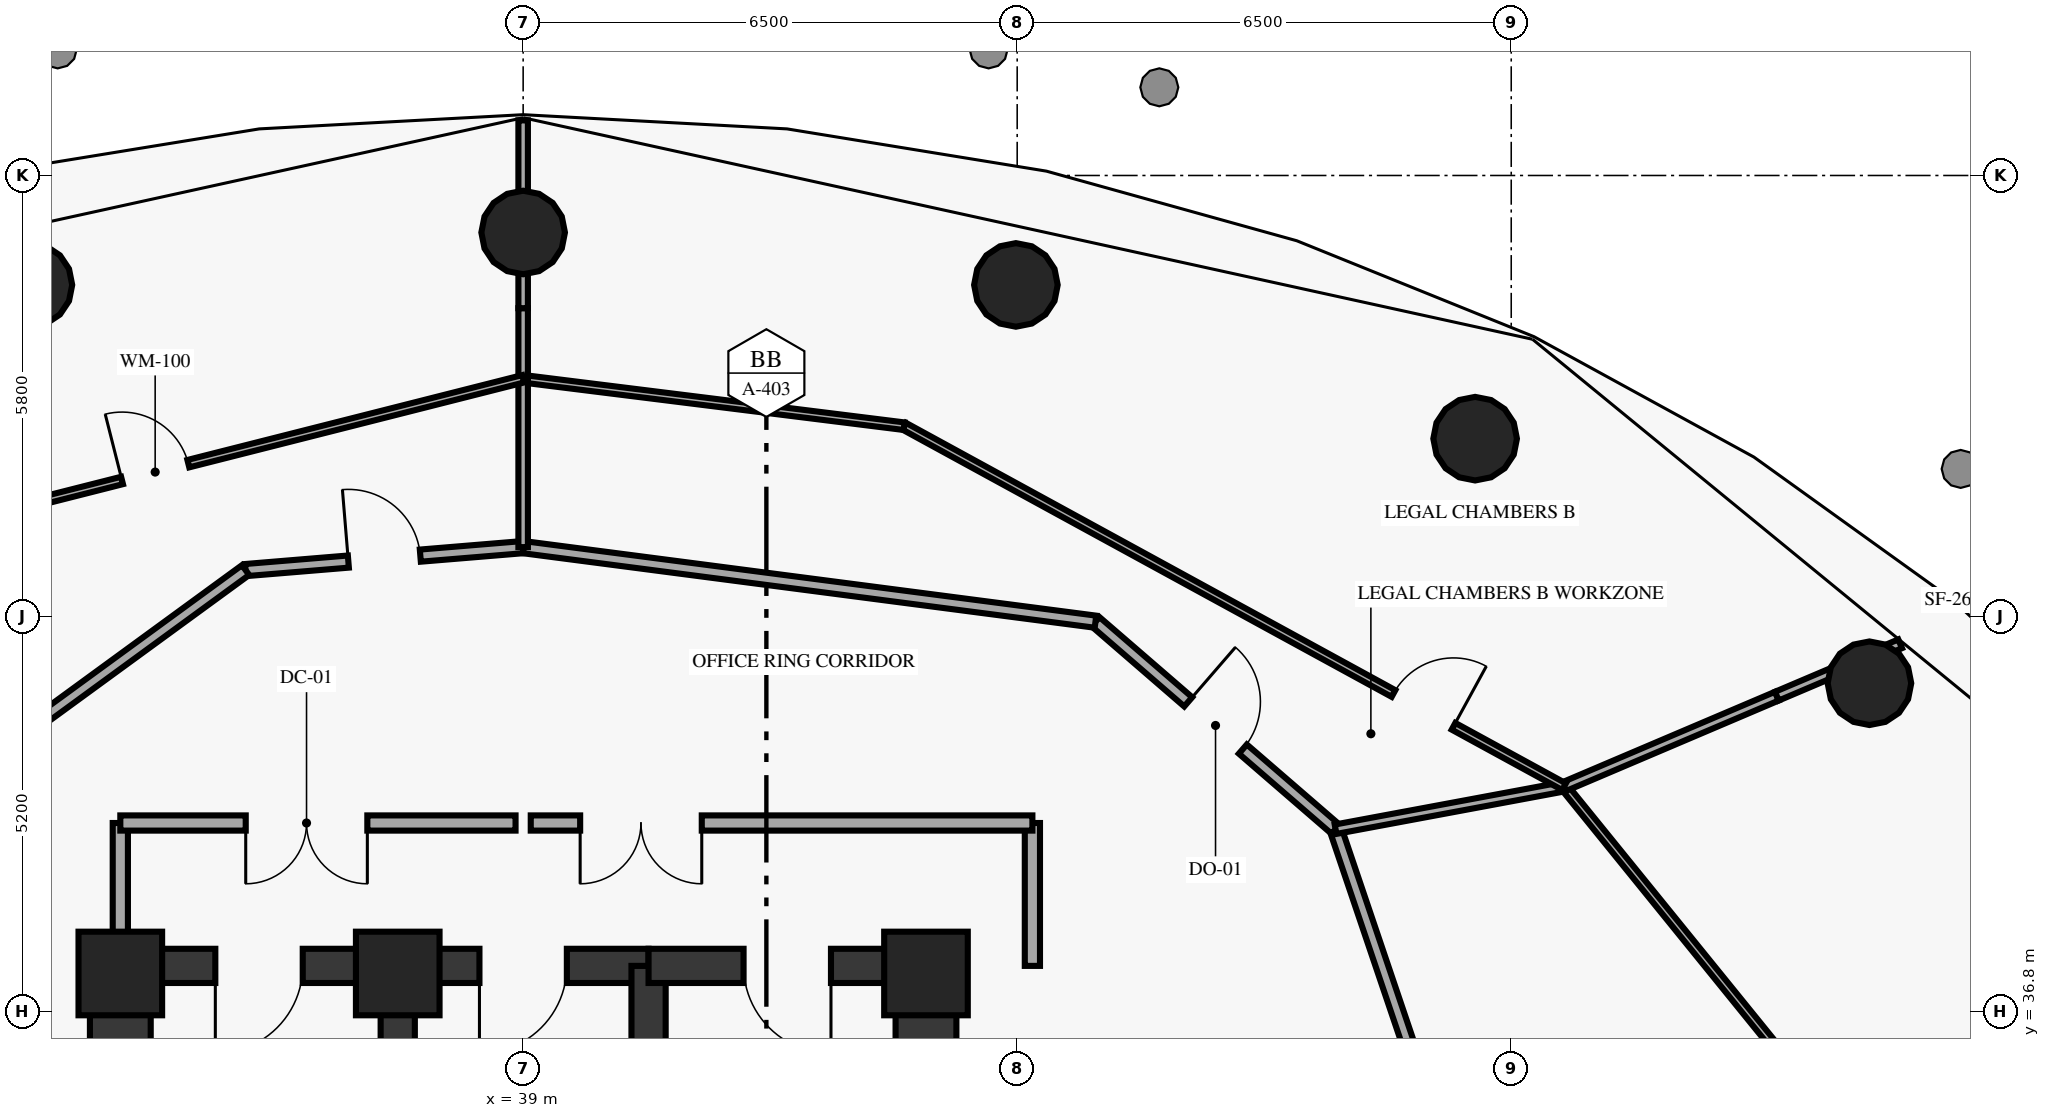
"""IFC4 building model, lengths in metres.
Left out: names, types, materials, properties, quantities, classifications, styles, units other than length and angle.
Written with IfcOpenShell. Run it as: python <this file> out.ifc"""

import sys

from ifc_helpers import new_model, si_unit, direction, frame, frame_2d, origin, origin_2d, place, context, subcontext, project, spatial, rectangle, circle, extrude, element, fill, save


model = new_model("IFC4")
c1 = context("Model", 3, precision=1e-05, world=origin(), true_north=direction((0.0, 1.0)))
c2 = subcontext(c1, "Body", "Model", "MODEL_VIEW")
j1 = project(units=[si_unit("LENGTHUNIT", "METRE"), si_unit("PLANEANGLEUNIT", "RADIAN")], contexts=[c1])
p1 = place(None, origin())
s1 = spatial("IfcSite", under=j1, at=p1, CompositionType="ELEMENT")
p2 = place(p1, origin())
s2 = spatial("IfcBuilding", under=s1, at=p2, CompositionType="ELEMENT")
p3 = place(p2, frame((0.0, 0.0, 53.4)))
s3 = spatial("IfcBuildingStorey", under=s2, at=p3, CompositionType="ELEMENT", Elevation=53.4)
for number, where, z_axis, x_axis in (
    (1, (44.3, 37.3, 0.0), (0.0, 0.0, 1.0), (1.0, 0.0, 0.0)),
    (2, (37.35, 37.3, 0.0), (0.0, 0.0, 1.0), (1.0, 0.0, 0.0)),
    (3, (33.7, 37.3, 0.0), (0.0, 0.0, 1.0), (1.0, 0.0, 0.0)),
):
    element("IfcColumn", number, at=place(p3, frame(where, z_axis=z_axis, x_axis=x_axis)), inside=s3, PredefinedType="PILASTER", context=c2, shape_type="SweptSolid", body=[
        extrude(rectangle(XDim=1.1, YDim=1.1, at=origin_2d()), origin(), (0.0, 0.0, 1.0), 3.8),
    ])
for number, where, z_axis, x_axis in (
    (4, (56.713, 41.119, 0.0), (0.0, 0.0, 1.0), (1.0, 0.0, 0.0)),
    (5, (51.525, 44.337, 0.0), (0.0, 0.0, 1.0), (1.0, 0.0, 0.0)),
    (6, (45.483, 46.36, 0.0), (0.0, 0.0, 1.0), (1.0, 0.0, 0.0)),
    (7, (39.0, 47.05, 0.0), (0.0, 0.0, 1.0), (1.0, 0.0, 0.0)),
    (8, (32.517, 46.36, 0.0), (0.0, 0.0, 1.0), (1.0, 0.0, 0.0)),
):
    element("IfcColumn", number, at=place(p3, frame(where, z_axis=z_axis, x_axis=x_axis)), inside=s3, PredefinedType="COLUMN", context=c2, shape_type="SweptSolid", body=[
        extrude(circle(Radius=0.55, at=origin_2d()), origin(), (0.0, 0.0, 1.0), 3.8),
    ])
for number, where, z_axis, x_axis in (
    (9, (33.7, 29.05, 0.0), (0.0, 0.0, 1.0), (0.0, 1.0, 0.0)),
    (10, (44.3, 29.05, 0.0), (0.0, 0.0, 1.0), (0.0, 1.0, 0.0)),
):
    element("IfcWall", number, at=place(p3, frame(where, z_axis=z_axis, x_axis=x_axis)), inside=s3, PredefinedType="SHEAR", context=c2, shape_type="SweptSolid", body=[
        extrude(rectangle(XDim=8.35, YDim=0.8, at=frame_2d((4.175, 0.0))), origin(), (0.0, 0.0, 1.0), 3.8),
    ])
p4 = place(p3, frame((37.35, 37.4, 0.0), z_axis=(0.0, 0.0, 1.0), x_axis=(-1.0, 0.0, 0.0)))
e11 = element("IfcWall", 11, at=p4, inside=s3, PredefinedType="SHEAR", context=c2, shape_type="SweptSolid", body=[
    extrude(rectangle(XDim=3.65, YDim=0.45, at=frame_2d((1.825, 0.0))), origin(), (0.0, 0.0, 1.0), 3.8),
])
p5 = place(p4, frame((1.25, 0.0, 0.0)))
e12 = element("IfcOpeningElement", 12, at=p5, cuts=e11, PredefinedType="OPENING", context=c2, shape_type="SweptSolid", body=[
    extrude(rectangle(XDim=1.15, YDim=2.15, at=frame_2d((0.575, 1.075))), frame((0.0, 0.235, 0.0), z_axis=(0.0, -1.0, 0.0), x_axis=(1.0, 0.0, 0.0)), (0.0, 0.0, 1.0), 0.47),
])
p6 = place(p3, frame((37.35, 29.05, 0.0), z_axis=(0.0, 0.0, 1.0), x_axis=(0.0, 1.0, 0.0)))
e13 = element("IfcWall", 13, at=p6, inside=s3, PredefinedType="SHEAR", context=c2, shape_type="SweptSolid", body=[
    extrude(rectangle(XDim=8.35, YDim=0.45, at=frame_2d((4.175, 0.0))), origin(), (0.0, 0.0, 1.0), 3.8),
])
p7 = place(p3, frame((40.65, 37.4, 0.0), z_axis=(0.0, 0.0, 1.0), x_axis=(-1.0, 0.0, 0.0)))
e14 = element("IfcWall", 14, at=p7, inside=s3, PredefinedType="SHEAR", context=c2, shape_type="SweptSolid", body=[
    extrude(rectangle(XDim=3.3, YDim=0.45, at=frame_2d((1.65, 0.0))), origin(), (0.0, 0.0, 1.0), 3.8),
])
p8 = place(p7, frame((1.075, 0.0, 0.0)))
e15 = element("IfcOpeningElement", 15, at=p8, cuts=e14, PredefinedType="OPENING", context=c2, shape_type="SweptSolid", body=[
    extrude(rectangle(XDim=1.15, YDim=2.15, at=frame_2d((0.575, 1.075))), frame((0.0, 0.235, 0.0), z_axis=(0.0, -1.0, 0.0), x_axis=(1.0, 0.0, 0.0)), (0.0, 0.0, 1.0), 0.47),
])
p9 = place(p3, frame((40.65, 29.05, 0.0), z_axis=(0.0, 0.0, 1.0), x_axis=(0.0, 1.0, 0.0)))
e16 = element("IfcWall", 16, at=p9, inside=s3, PredefinedType="SHEAR", context=c2, shape_type="SweptSolid", body=[
    extrude(rectangle(XDim=8.35, YDim=0.45, at=frame_2d((4.175, 0.0))), origin(), (0.0, 0.0, 1.0), 3.8),
])
p10 = place(p3, frame((44.3, 37.4, 0.0), z_axis=(0.0, 0.0, 1.0), x_axis=(-1.0, 0.0, 0.0)))
e17 = element("IfcWall", 17, at=p10, inside=s3, PredefinedType="SHEAR", context=c2, shape_type="SweptSolid", body=[
    extrude(rectangle(XDim=3.65, YDim=0.45, at=frame_2d((1.825, 0.0))), origin(), (0.0, 0.0, 1.0), 3.8),
])
p11 = place(p10, frame((1.25, 0.0, 0.0)))
e18 = element("IfcOpeningElement", 18, at=p11, cuts=e17, PredefinedType="OPENING", context=c2, shape_type="SweptSolid", body=[
    extrude(rectangle(XDim=1.15, YDim=2.15, at=frame_2d((0.575, 1.075))), frame((0.0, 0.235, 0.0), z_axis=(0.0, -1.0, 0.0), x_axis=(1.0, 0.0, 0.0)), (0.0, 0.0, 1.0), 0.47),
])
for number, where, z_axis, x_axis in (
    (19, (33.7, 37.4, 0.0), (0.0, 0.0, 1.0), (0.0, 1.0, 0.0)),
    (20, (45.7, 37.4, 0.0), (0.0, 0.0, 1.0), (0.0, 1.0, 0.0)),
):
    element("IfcWall", number, at=place(p3, frame(where, z_axis=z_axis, x_axis=x_axis)), inside=s3, PredefinedType="SOLIDWALL", context=c2, shape_type="SweptSolid", body=[
        extrude(rectangle(XDim=1.88, YDim=0.2, at=frame_2d((0.94, 0.0))), origin(), (0.0, 0.0, 1.0), 3.8),
    ])
p12 = place(p3, frame((38.9, 39.28, 0.0), z_axis=(0.0, 0.0, 1.0), x_axis=(-1.0, 0.0, 0.0)))
e21 = element("IfcWall", 21, at=p12, inside=s3, PredefinedType="SOLIDWALL", context=c2, shape_type="SweptSolid", body=[
    extrude(rectangle(XDim=5.2, YDim=0.2, at=frame_2d((2.6, 0.0))), origin(), (0.0, 0.0, 1.0), 3.8),
])
p13 = place(p12, frame((1.95, 0.0, 0.0)))
e22 = element("IfcOpeningElement", 22, at=p13, cuts=e21, PredefinedType="OPENING", context=c2, shape_type="SweptSolid", body=[
    extrude(rectangle(XDim=1.6, YDim=2.2, at=frame_2d((0.8, 1.1))), frame((0.0, 0.11, 0.0), z_axis=(0.0, -1.0, 0.0), x_axis=(1.0, 0.0, 0.0)), (0.0, 0.0, 1.0), 0.22),
])
p14 = place(p3, frame((45.7, 39.28, 0.0), z_axis=(0.0, 0.0, 1.0), x_axis=(-1.0, 0.0, 0.0)))
e23 = element("IfcWall", 23, at=p14, inside=s3, PredefinedType="SOLIDWALL", context=c2, shape_type="SweptSolid", body=[
    extrude(rectangle(XDim=6.6, YDim=0.2, at=frame_2d((3.3, 0.0))), origin(), (0.0, 0.0, 1.0), 3.8),
])
p15 = place(p14, frame((4.35, 0.0, 0.0)))
e24 = element("IfcOpeningElement", 24, at=p15, cuts=e23, PredefinedType="OPENING", context=c2, shape_type="SweptSolid", body=[
    extrude(rectangle(XDim=1.6, YDim=2.2, at=frame_2d((0.8, 1.1))), frame((0.0, 0.11, 0.0), z_axis=(0.0, -1.0, 0.0), x_axis=(1.0, 0.0, 0.0)), (0.0, 0.0, 1.0), 0.22),
])
p16 = place(p3, frame((52.47, 30.987, 0.0), z_axis=(0.0, 0.0, 1.0), x_axis=(-0.320794809252, 0.947148716072, 0.0)))
e25 = element("IfcWall", 25, at=p16, inside=s3, PredefinedType="PARTITIONING", context=c2, shape_type="SweptSolid", body=[
    extrude(rectangle(XDim=8.669, YDim=0.16, at=frame_2d((4.334, 0.0))), origin(), (0.0, 0.0, 1.0), 3.8),
])
p17 = place(p3, frame((46.53, 41.929, 0.0), z_axis=(0.0, 0.0, 1.0), x_axis=(0.756492941082, -0.654001857867, 0.0)))
e26 = element("IfcWall", 26, at=p17, inside=s3, PredefinedType="PARTITIONING", context=c2, shape_type="SweptSolid", body=[
    extrude(rectangle(XDim=4.176, YDim=0.16, at=frame_2d((2.088, 0.0))), origin(), (0.0, 0.0, 1.0), 3.8),
])
p18 = place(p17, frame((1.613, 0.0, 0.0)))
e27 = element("IfcOpeningElement", 27, at=p18, cuts=e26, PredefinedType="OPENING", context=c2, shape_type="SweptSolid", body=[
    extrude(rectangle(XDim=0.95, YDim=2.15, at=frame_2d((0.475, 1.075))), frame((0.0, 0.09, 0.0), z_axis=(0.0, -1.0, 0.0), x_axis=(1.0, 0.0, 0.0)), (0.0, 0.0, 1.0), 0.18),
])
p19 = place(p3, frame((46.53, 41.929, 0.0), z_axis=(0.0, 0.0, 1.0), x_axis=(-0.99162101561, 0.129181118592, 0.0)))
e28 = element("IfcWall", 28, at=p19, inside=s3, PredefinedType="PARTITIONING", context=c2, shape_type="SweptSolid", body=[
    extrude(rectangle(XDim=7.594, YDim=0.16, at=frame_2d((3.797, 0.0))), origin(), (0.0, 0.0, 1.0), 3.8),
])
p20 = place(p3, frame((35.348, 42.608, 0.0), z_axis=(0.0, 0.0, 1.0), x_axis=(0.996598394666, 0.082411405455, 0.0)))
e29 = element("IfcWall", 29, at=p20, inside=s3, PredefinedType="PARTITIONING", context=c2, shape_type="SweptSolid", body=[
    extrude(rectangle(XDim=3.665, YDim=0.16, at=frame_2d((1.832, 0.0))), origin(), (0.0, 0.0, 1.0), 3.8),
])
p21 = place(p20, frame((1.357, 0.0, 0.0)))
e30 = element("IfcOpeningElement", 30, at=p21, cuts=e29, PredefinedType="OPENING", context=c2, shape_type="SweptSolid", body=[
    extrude(rectangle(XDim=0.95, YDim=2.15, at=frame_2d((0.475, 1.075))), frame((0.0, 0.09, 0.0), z_axis=(0.0, -1.0, 0.0), x_axis=(1.0, 0.0, 0.0)), (0.0, 0.0, 1.0), 0.18),
])
p22 = place(p3, frame((35.348, 42.608, 0.0), z_axis=(0.0, 0.0, 1.0), x_axis=(-0.807666592587, -0.589639445101, 0.0)))
e31 = element("IfcWall", 31, at=p22, inside=s3, PredefinedType="PARTITIONING", context=c2, shape_type="SweptSolid", body=[
    extrude(rectangle(XDim=7.581, YDim=0.16, at=frame_2d((3.791, 0.0))), origin(), (0.0, 0.0, 1.0), 3.8),
])
p23 = place(p3, frame((55.772, 35.962, 0.0), z_axis=(0.0, 0.0, 1.0), x_axis=(-0.629672409309, 0.776860770637, 0.0)))
e32 = element("IfcWall", 32, at=p23, inside=s3, PredefinedType="MOVABLE", context=c2, shape_type="SweptSolid", body=[
    extrude(rectangle(XDim=4.886, YDim=0.1, at=frame_2d((2.443, 0.0))), origin(), (0.0, 0.0, 1.0), 3.8),
])
p24 = place(p3, frame((49.689, 39.198, 0.0), z_axis=(0.0, 0.0, 1.0), x_axis=(0.983083941647, 0.183155572333, 0.0)))
e33 = element("IfcWall", 33, at=p24, inside=s3, PredefinedType="PARTITIONING", context=c2, shape_type="SweptSolid", body=[
    extrude(rectangle(XDim=3.058, YDim=0.125, at=frame_2d((1.529, 0.0))), origin(), (0.0, 0.0, 1.0), 3.02),
])
p25 = place(p3, frame((52.695, 39.758, 0.0), z_axis=(0.0, 0.0, 1.0), x_axis=(0.92022473881, 0.391390380671, 0.0)))
e34 = element("IfcWall", 34, at=p25, inside=s3, PredefinedType="PARTITIONING", context=c2, shape_type="SweptSolid", body=[
    extrude(rectangle(XDim=3.043, YDim=0.125, at=frame_2d((1.521, 0.0))), origin(), (0.0, 0.0, 1.0), 3.02),
])
p26 = place(p3, frame((55.495, 40.949, 0.0), z_axis=(0.0, 0.0, 1.0), x_axis=(0.920394497478, 0.390991008864, 0.0)))
e35 = element("IfcWall", 35, at=p26, inside=s3, PredefinedType="PARTITIONING", context=c2, shape_type="SweptSolid", body=[
    extrude(rectangle(XDim=1.762, YDim=0.125, at=frame_2d((0.881, 0.0))), origin(), (0.0, 0.0, 1.0), 3.8),
])
p27 = place(p3, frame((44.013, 44.501, 0.0), z_axis=(0.0, 0.0, 1.0), x_axis=(0.877588886427, -0.479413961437, 0.0)))
e36 = element("IfcWall", 36, at=p27, inside=s3, PredefinedType="MOVABLE", context=c2, shape_type="SweptSolid", body=[
    extrude(rectangle(XDim=9.893, YDim=0.1, at=frame_2d((4.947, 0.0))), origin(), (0.0, 0.0, 1.0), 3.8),
])
p28 = place(p27, frame((7.336, 0.0, 0.0)))
e37 = element("IfcOpeningElement", 37, at=p28, cuts=e36, PredefinedType="OPENING", context=c2, shape_type="SweptSolid", body=[
    extrude(rectangle(XDim=0.9, YDim=2.1, at=frame_2d((0.45, 1.05))), frame((0.0, 0.06, 0.0), z_axis=(0.0, -1.0, 0.0), x_axis=(1.0, 0.0, 0.0)), (0.0, 0.0, 1.0), 0.12),
])
p29 = place(p3, frame((44.013, 44.501, 0.0), z_axis=(0.0, 0.0, 1.0), x_axis=(-0.992340947468, 0.123529121985, 0.0)))
e38 = element("IfcWall", 38, at=p29, inside=s3, PredefinedType="MOVABLE", context=c2, shape_type="SweptSolid", body=[
    extrude(rectangle(XDim=5.052, YDim=0.1, at=frame_2d((2.526, 0.0))), origin(), (0.0, 0.0, 1.0), 3.8),
])
p30 = place(p3, frame((39.0, 42.91, 0.0), z_axis=(0.0, 0.0, 1.0), x_axis=(0.0, 1.0, 0.0)))
e39 = element("IfcWall", 39, at=p30, inside=s3, PredefinedType="PARTITIONING", context=c2, shape_type="SweptSolid", body=[
    extrude(rectangle(XDim=2.215, YDim=0.125, at=frame_2d((1.107, 0.0))), origin(), (0.0, 0.0, 1.0), 3.8),
])
p31 = place(p3, frame((39.0, 45.125, 0.0), z_axis=(0.0, 0.0, 1.0), x_axis=(0.0, 1.0, 0.0)))
e40 = element("IfcWall", 40, at=p31, inside=s3, PredefinedType="PARTITIONING", context=c2, shape_type="SweptSolid", body=[
    extrude(rectangle(XDim=0.929, YDim=0.125, at=frame_2d((0.464, 0.0))), origin(), (0.0, 0.0, 1.0), 3.8),
])
p32 = place(p3, frame((39.0, 46.054, 0.0), z_axis=(0.0, 0.0, 1.0), x_axis=(0.0, 1.0, 0.0)))
e41 = element("IfcWall", 41, at=p32, inside=s3, PredefinedType="PARTITIONING", context=c2, shape_type="SweptSolid", body=[
    extrude(rectangle(XDim=1.007, YDim=0.125, at=frame_2d((0.503, 0.0))), origin(), (0.0, 0.0, 1.0), 3.265),
])
p33 = place(p3, frame((39.0, 47.061, 0.0), z_axis=(0.0, 0.0, 1.0), x_axis=(0.0, 1.0, 0.0)))
e42 = element("IfcWall", 42, at=p33, inside=s3, PredefinedType="PARTITIONING", context=c2, shape_type="SweptSolid", body=[
    extrude(rectangle(XDim=1.464, YDim=0.125, at=frame_2d((0.732, 0.0))), origin(), (0.0, 0.0, 1.0), 3.8),
])
p34 = place(p3, frame((29.317, 42.67, 0.0), z_axis=(0.0, 0.0, 1.0), x_axis=(0.969329167934, 0.245766076162, 0.0)))
e43 = element("IfcWall", 43, at=p34, inside=s3, PredefinedType="MOVABLE", context=c2, shape_type="SweptSolid", body=[
    extrude(rectangle(XDim=9.99, YDim=0.1, at=frame_2d((4.995, 0.0))), origin(), (0.0, 0.0, 1.0), 3.8),
])
p35 = place(p34, frame((4.545, 0.0, 0.0)))
e44 = element("IfcOpeningElement", 44, at=p35, cuts=e43, PredefinedType="OPENING", context=c2, shape_type="SweptSolid", body=[
    extrude(rectangle(XDim=0.9, YDim=2.1, at=frame_2d((0.45, 1.05))), frame((0.0, 0.06, 0.0), z_axis=(0.0, -1.0, 0.0), x_axis=(1.0, 0.0, 0.0)), (0.0, 0.0, 1.0), 0.12),
])
p36 = place(p5, origin())
e45 = element("IfcDoor", 45, at=p36, inside=s3, OperationType="SINGLE_SWING_RIGHT", PredefinedType="DOOR", context=c2, shape_type="SweptSolid", body=[
    extrude(rectangle(XDim=1.15, YDim=2.15, at=frame_2d((0.575, 1.075))), frame((0.0, 0.025, 0.0), z_axis=(0.0, -1.0, 0.0), x_axis=(1.0, 0.0, 0.0)), (0.0, 0.0, 1.0), 0.05),
])
fill(e12, e45)
p37 = place(p8, origin())
e46 = element("IfcDoor", 46, at=p37, inside=s3, OperationType="SINGLE_SWING_RIGHT", PredefinedType="DOOR", context=c2, shape_type="SweptSolid", body=[
    extrude(rectangle(XDim=1.15, YDim=2.15, at=frame_2d((0.575, 1.075))), frame((0.0, 0.025, 0.0), z_axis=(0.0, -1.0, 0.0), x_axis=(1.0, 0.0, 0.0)), (0.0, 0.0, 1.0), 0.05),
])
fill(e15, e46)
p38 = place(p11, origin())
e47 = element("IfcDoor", 47, at=p38, inside=s3, OperationType="SINGLE_SWING_LEFT", PredefinedType="DOOR", context=c2, shape_type="SweptSolid", body=[
    extrude(rectangle(XDim=1.15, YDim=2.15, at=frame_2d((0.575, 1.075))), frame((0.0, 0.025, 0.0), z_axis=(0.0, -1.0, 0.0), x_axis=(1.0, 0.0, 0.0)), (0.0, 0.0, 1.0), 0.05),
])
fill(e18, e47)
p39 = place(p13, origin())
e48 = element("IfcDoor", 48, at=p39, inside=s3, OperationType="DOUBLE_DOOR_SINGLE_SWING", PredefinedType="DOOR", context=c2, shape_type="SweptSolid", body=[
    extrude(rectangle(XDim=1.6, YDim=2.2, at=frame_2d((0.8, 1.1))), frame((0.0, 0.025, 0.0), z_axis=(0.0, -1.0, 0.0), x_axis=(1.0, 0.0, 0.0)), (0.0, 0.0, 1.0), 0.05),
])
fill(e22, e48)
p40 = place(p15, origin())
e49 = element("IfcDoor", 49, at=p40, inside=s3, OperationType="DOUBLE_DOOR_SINGLE_SWING", PredefinedType="DOOR", context=c2, shape_type="SweptSolid", body=[
    extrude(rectangle(XDim=1.6, YDim=2.2, at=frame_2d((0.8, 1.1))), frame((0.0, 0.025, 0.0), z_axis=(0.0, -1.0, 0.0), x_axis=(1.0, 0.0, 0.0)), (0.0, 0.0, 1.0), 0.05),
])
fill(e24, e49)
p41 = place(p18, origin())
e50 = element("IfcDoor", 50, at=p41, inside=s3, OperationType="SINGLE_SWING_LEFT", PredefinedType="DOOR", context=c2, shape_type="SweptSolid", body=[
    extrude(rectangle(XDim=0.95, YDim=2.15, at=frame_2d((0.475, 1.075))), frame((0.0, 0.025, 0.0), z_axis=(0.0, -1.0, 0.0), x_axis=(1.0, 0.0, 0.0)), (0.0, 0.0, 1.0), 0.05),
])
fill(e27, e50)
p42 = place(p21, origin())
e51 = element("IfcDoor", 51, at=p42, inside=s3, OperationType="SINGLE_SWING_LEFT", PredefinedType="DOOR", context=c2, shape_type="SweptSolid", body=[
    extrude(rectangle(XDim=0.95, YDim=2.15, at=frame_2d((0.475, 1.075))), frame((0.0, 0.025, 0.0), z_axis=(0.0, -1.0, 0.0), x_axis=(1.0, 0.0, 0.0)), (0.0, 0.0, 1.0), 0.05),
])
fill(e30, e51)
p43 = place(p28, origin())
e52 = element("IfcDoor", 52, at=p43, inside=s3, OperationType="SINGLE_SWING_RIGHT", PredefinedType="DOOR", context=c2, shape_type="SweptSolid", body=[
    extrude(rectangle(XDim=0.9, YDim=2.1, at=frame_2d((0.45, 1.05))), frame((0.0, 0.025, 0.0), z_axis=(0.0, -1.0, 0.0), x_axis=(1.0, 0.0, 0.0)), (0.0, 0.0, 1.0), 0.05),
])
fill(e37, e52)
p44 = place(p35, origin())
e53 = element("IfcDoor", 53, at=p44, inside=s3, OperationType="SINGLE_SWING_LEFT", PredefinedType="DOOR", context=c2, shape_type="SweptSolid", body=[
    extrude(rectangle(XDim=0.9, YDim=2.1, at=frame_2d((0.45, 1.05))), frame((0.0, 0.025, 0.0), z_axis=(0.0, -1.0, 0.0), x_axis=(1.0, 0.0, 0.0)), (0.0, 0.0, 1.0), 0.05),
])
fill(e44, e53)
save(model, sys.argv[1])
